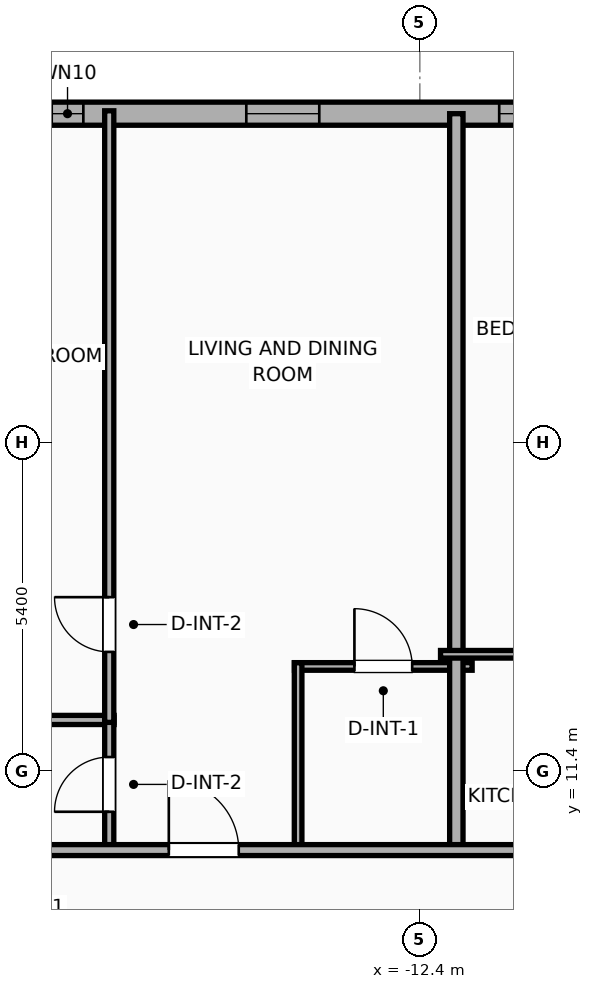
"""IFC4 building model, lengths in metres.
Left out: names, types, materials, properties, quantities, classifications, styles, units other than length and angle.
Written with IfcOpenShell. Run it as: python <this file> out.ifc"""

import sys

from ifc_helpers import new_model, si_unit, direction, frame, frame_2d, origin, place, context, subcontext, project, spatial, rectangle, extrude, element, fill, save


model = new_model("IFC4")
c1 = context("Model", 3, precision=1e-05, world=origin(), true_north=direction((0.0, 1.0)))
c2 = subcontext(c1, "Body", "Model", "MODEL_VIEW")
j1 = project(units=[si_unit("LENGTHUNIT", "METRE"), si_unit("PLANEANGLEUNIT", "RADIAN")], contexts=[c1])
p1 = place(None, origin())
s1 = spatial("IfcSite", under=j1, at=p1, CompositionType="ELEMENT")
p2 = place(p1, origin())
s2 = spatial("IfcBuilding", under=s1, at=p2, CompositionType="ELEMENT")
p3 = place(p2, frame((0.0, 0.0, 68.9)))
s3 = spatial("IfcBuildingStorey", under=s2, at=p3, CompositionType="ELEMENT", Elevation=68.9)
p4 = place(p3, frame((-29.581, 22.21, 0.0), z_axis=(0.0, 0.0, 1.0), x_axis=(1.0, 0.0, 0.0)))
e1 = element("IfcWall", 1, at=p4, inside=s3, PredefinedType="ELEMENTEDWALL", context=c2, shape_type="SweptSolid", body=[
    extrude(rectangle(XDim=51.963, YDim=0.38, at=frame_2d((25.981, 0.0))), origin(), (0.0, 0.0, 1.0), 3.65),
])
p5 = place(p4, frame((5.81, 0.0, 0.75)))
e2 = element("IfcOpeningElement", 2, at=p5, cuts=e1, PredefinedType="OPENING", context=c2, shape_type="SweptSolid", body=[
    extrude(rectangle(XDim=2.4, YDim=2.1, at=frame_2d((1.2, 1.05))), frame((0.0, 0.2, 0.0), z_axis=(0.0, -1.0, 0.0), x_axis=(1.0, 0.0, 0.0)), (0.0, 0.0, 1.0), 0.4),
])
p6 = place(p4, frame((23.931, 0.0, 0.75)))
e3 = element("IfcOpeningElement", 3, at=p6, cuts=e1, PredefinedType="OPENING", context=c2, shape_type="SweptSolid", body=[
    extrude(rectangle(XDim=2.4, YDim=2.1, at=frame_2d((1.2, 1.05))), frame((0.0, 0.2, 0.0), z_axis=(0.0, -1.0, 0.0), x_axis=(1.0, 0.0, 0.0)), (0.0, 0.0, 1.0), 0.4),
])
p7 = place(p4, frame((3.056, 0.0, 0.75)))
e4 = element("IfcOpeningElement", 4, at=p7, cuts=e1, PredefinedType="OPENING", context=c2, shape_type="SweptSolid", body=[
    extrude(rectangle(XDim=1.2, YDim=2.05, at=frame_2d((0.6, 1.025))), frame((0.0, 0.2, 0.0), z_axis=(0.0, -1.0, 0.0), x_axis=(1.0, 0.0, 0.0)), (0.0, 0.0, 1.0), 0.4),
])
p8 = place(p4, frame((11.127, 0.0, 0.75)))
e5 = element("IfcOpeningElement", 5, at=p8, cuts=e1, PredefinedType="OPENING", context=c2, shape_type="SweptSolid", body=[
    extrude(rectangle(XDim=0.52, YDim=2.05, at=frame_2d((0.26, 1.025))), frame((0.0, 0.2, 0.0), z_axis=(0.0, -1.0, 0.0), x_axis=(1.0, 0.0, 0.0)), (0.0, 0.0, 1.0), 0.4),
])
p9 = place(p4, frame((14.327, 0.0, 0.75)))
e6 = element("IfcOpeningElement", 6, at=p9, cuts=e1, PredefinedType="OPENING", context=c2, shape_type="SweptSolid", body=[
    extrude(rectangle(XDim=1.2, YDim=2.05, at=frame_2d((0.6, 1.025))), frame((0.0, 0.2, 0.0), z_axis=(0.0, -1.0, 0.0), x_axis=(1.0, 0.0, 0.0)), (0.0, 0.0, 1.0), 0.4),
])
p10 = place(p4, frame((21.641, 0.0, 0.75)))
e7 = element("IfcOpeningElement", 7, at=p10, cuts=e1, PredefinedType="OPENING", context=c2, shape_type="SweptSolid", body=[
    extrude(rectangle(XDim=1.2, YDim=2.05, at=frame_2d((0.6, 1.025))), frame((0.0, 0.2, 0.0), z_axis=(0.0, -1.0, 0.0), x_axis=(1.0, 0.0, 0.0)), (0.0, 0.0, 1.0), 0.4),
])
p11 = place(p4, frame((18.486, 0.0, 0.75)))
e8 = element("IfcOpeningElement", 8, at=p11, cuts=e1, PredefinedType="OPENING", context=c2, shape_type="SweptSolid", body=[
    extrude(rectangle(XDim=1.2, YDim=2.05, at=frame_2d((0.6, 1.025))), frame((0.0, 0.2, 0.0), z_axis=(0.0, -1.0, 0.0), x_axis=(1.0, 0.0, 0.0)), (0.0, 0.0, 1.0), 0.4),
])
p12 = place(p4, frame((28.976, 0.0, 0.75)))
e9 = element("IfcOpeningElement", 9, at=p12, cuts=e1, PredefinedType="OPENING", context=c2, shape_type="SweptSolid", body=[
    extrude(rectangle(XDim=1.2, YDim=2.05, at=frame_2d((0.6, 1.025))), frame((0.0, 0.2, 0.0), z_axis=(0.0, -1.0, 0.0), x_axis=(1.0, 0.0, 0.0)), (0.0, 0.0, 1.0), 0.4),
])
p13 = place(p4, frame((33.476, 0.0, 0.75)))
e10 = element("IfcOpeningElement", 10, at=p13, cuts=e1, PredefinedType="OPENING", context=c2, shape_type="SweptSolid", body=[
    extrude(rectangle(XDim=1.2, YDim=2.05, at=frame_2d((0.6, 1.025))), frame((0.0, 0.2, 0.0), z_axis=(0.0, -1.0, 0.0), x_axis=(1.0, 0.0, 0.0)), (0.0, 0.0, 1.0), 0.4),
])
p14 = place(p4, frame((36.752, 0.0, 0.75)))
e11 = element("IfcOpeningElement", 11, at=p14, cuts=e1, PredefinedType="OPENING", context=c2, shape_type="SweptSolid", body=[
    extrude(rectangle(XDim=1.2, YDim=2.05, at=frame_2d((0.6, 1.025))), frame((0.0, 0.2, 0.0), z_axis=(0.0, -1.0, 0.0), x_axis=(1.0, 0.0, 0.0)), (0.0, 0.0, 1.0), 0.4),
])
p15 = place(p4, frame((42.452, 0.0, 0.75)))
e12 = element("IfcOpeningElement", 12, at=p15, cuts=e1, PredefinedType="OPENING", context=c2, shape_type="SweptSolid", body=[
    extrude(rectangle(XDim=1.2, YDim=2.05, at=frame_2d((0.6, 1.025))), frame((0.0, 0.2, 0.0), z_axis=(0.0, -1.0, 0.0), x_axis=(1.0, 0.0, 0.0)), (0.0, 0.0, 1.0), 0.4),
])
p16 = place(p4, frame((45.831, 0.0, 0.75)))
e13 = element("IfcOpeningElement", 13, at=p16, cuts=e1, PredefinedType="OPENING", context=c2, shape_type="SweptSolid", body=[
    extrude(rectangle(XDim=1.2, YDim=2.05, at=frame_2d((0.6, 1.025))), frame((0.0, 0.2, 0.0), z_axis=(0.0, -1.0, 0.0), x_axis=(1.0, 0.0, 0.0)), (0.0, 0.0, 1.0), 0.4),
])
p17 = place(p4, frame((48.585, 0.0, 0.75)))
e14 = element("IfcOpeningElement", 14, at=p17, cuts=e1, PredefinedType="OPENING", context=c2, shape_type="SweptSolid", body=[
    extrude(rectangle(XDim=1.2, YDim=2.05, at=frame_2d((0.6, 1.025))), frame((0.0, 0.2, 0.0), z_axis=(0.0, -1.0, 0.0), x_axis=(1.0, 0.0, 0.0)), (0.0, 0.0, 1.0), 0.4),
])
p18 = place(p4, frame((50.421, 0.0, 0.75)))
e15 = element("IfcOpeningElement", 15, at=p18, cuts=e1, PredefinedType="OPENING", context=c2, shape_type="SweptSolid", body=[
    extrude(rectangle(XDim=0.52, YDim=2.05, at=frame_2d((0.26, 1.025))), frame((0.0, 0.2, 0.0), z_axis=(0.0, -1.0, 0.0), x_axis=(1.0, 0.0, 0.0)), (0.0, 0.0, 1.0), 0.4),
])
p19 = place(p3, frame((-21.06, 12.24, 0.0), z_axis=(0.0, 0.0, 1.0), x_axis=(1.0, 0.0, 0.0)))
e16 = element("IfcWall", 16, at=p19, inside=s3, PredefinedType="PLUMBINGWALL", context=c2, shape_type="SweptSolid", body=[
    extrude(rectangle(XDim=3.632, YDim=0.15, at=frame_2d((1.816, 0.0))), origin(), (0.0, 0.0, 1.0), 3.65),
])
p20 = place(p3, frame((-17.508, 10.08, 0.0), z_axis=(0.0, 0.0, 1.0), x_axis=(0.0, 1.0, 0.0)))
e17 = element("IfcWall", 17, at=p20, inside=s3, PredefinedType="PLUMBINGWALL", context=c2, shape_type="SweptSolid", body=[
    extrude(rectangle(XDim=2.2, YDim=0.15, at=frame_2d((1.1, 0.0))), origin(), (0.0, 0.0, 1.0), 3.65),
])
p21 = place(p20, frame((0.65, 0.0, 0.0)))
e18 = element("IfcOpeningElement", 18, at=p21, cuts=e17, PredefinedType="OPENING", context=c2, shape_type="SweptSolid", body=[
    extrude(rectangle(XDim=0.9, YDim=2.05, at=frame_2d((0.45, 1.025))), frame((0.0, 0.085, 0.0), z_axis=(0.0, -1.0, 0.0), x_axis=(1.0, 0.0, 0.0)), (0.0, 0.0, 1.0), 0.17),
])
p22 = place(p3, frame((-17.508, 12.2, 0.0), z_axis=(0.0, 0.0, 1.0), x_axis=(0.0, 1.0, 0.0)))
e19 = element("IfcWall", 19, at=p22, inside=s3, PredefinedType="PLUMBINGWALL", context=c2, shape_type="SweptSolid", body=[
    extrude(rectangle(XDim=10.058, YDim=0.15, at=frame_2d((5.029, 0.0))), origin(), (0.0, 0.0, 1.0), 3.65),
])
p23 = place(p22, frame((1.159, 0.0, 0.0)))
e20 = element("IfcOpeningElement", 20, at=p23, cuts=e19, PredefinedType="OPENING", context=c2, shape_type="SweptSolid", body=[
    extrude(rectangle(XDim=0.9, YDim=2.05, at=frame_2d((0.45, 1.025))), frame((0.0, 0.085, 0.0), z_axis=(0.0, -1.0, 0.0), x_axis=(1.0, 0.0, 0.0)), (0.0, 0.0, 1.0), 0.17),
])
p24 = place(p3, frame((-14.462, 13.12, 0.0), z_axis=(0.0, 0.0, 1.0), x_axis=(1.0, 0.0, 0.0)))
e21 = element("IfcWall", 21, at=p24, inside=s3, PredefinedType="PARTITIONING", context=c2, shape_type="SweptSolid", body=[
    extrude(rectangle(XDim=2.922, YDim=0.125, at=frame_2d((1.461, 0.0))), origin(), (0.0, 0.0, 1.0), 3.65),
])
p25 = place(p24, frame((0.986, 0.0, 0.0)))
e22 = element("IfcOpeningElement", 22, at=p25, cuts=e21, PredefinedType="OPENING", context=c2, shape_type="SweptSolid", body=[
    extrude(rectangle(XDim=0.95, YDim=2.05, at=frame_2d((0.475, 1.025))), frame((0.0, 0.073, 0.0), z_axis=(0.0, -1.0, 0.0), x_axis=(1.0, 0.0, 0.0)), (0.0, 0.0, 1.0), 0.145),
])
p26 = place(p3, frame((-14.402, 10.08, 0.0), z_axis=(0.0, 0.0, 1.0), x_axis=(0.0, 1.0, 0.0)))
e23 = element("IfcWall", 23, at=p26, inside=s3, PredefinedType="PARTITIONING", context=c2, shape_type="SweptSolid", body=[
    extrude(rectangle(XDim=3.1, YDim=0.125, at=frame_2d((1.55, 0.0))), origin(), (0.0, 0.0, 1.0), 3.65),
])
p27 = place(p3, frame((-11.8, 10.02, 0.0), z_axis=(0.0, 0.0, 1.0), x_axis=(0.0, 1.0, 0.0)))
e24 = element("IfcWall", 24, at=p27, inside=s3, PredefinedType="PARTITIONING", context=c2, shape_type="SweptSolid", body=[
    extrude(rectangle(XDim=12.19, YDim=0.22, at=frame_2d((6.095, 0.0))), origin(), (0.0, 0.0, 1.0), 2.94),
])
p28 = place(p3, frame((-12.06, 13.32, 0.0), z_axis=(0.0, 0.0, 1.0), x_axis=(1.0, 0.0, 0.0)))
e25 = element("IfcWall", 25, at=p28, inside=s3, PredefinedType="PARTITIONING", context=c2, shape_type="SweptSolid", body=[
    extrude(rectangle(XDim=2.99, YDim=0.125, at=frame_2d((1.495, 0.0))), origin(), (0.0, 0.0, 1.0), 3.65),
])
p29 = place(p3, frame((-33.41, 10.1, 0.0), z_axis=(0.0, 0.0, 1.0), x_axis=(1.0, 0.0, 0.0)))
e26 = element("IfcWall", 26, at=p29, inside=s3, PredefinedType="PARTITIONING", context=c2, shape_type="SweptSolid", body=[
    extrude(rectangle(XDim=59.62, YDim=0.18, at=frame_2d((29.81, 0.0))), origin(), (0.0, 0.0, 1.0), 3.65),
])
p30 = place(p29, frame((2.793, 0.0, 0.0)))
e27 = element("IfcOpeningElement", 27, at=p30, cuts=e26, PredefinedType="OPENING", context=c2, shape_type="SweptSolid", body=[
    extrude(rectangle(XDim=0.9, YDim=2.05, at=frame_2d((0.45, 1.025))), frame((0.0, 0.1, 0.0), z_axis=(0.0, -1.0, 0.0), x_axis=(1.0, 0.0, 0.0)), (0.0, 0.0, 1.0), 0.2),
])
p31 = place(p29, frame((10.037, 0.0, 0.0)))
e28 = element("IfcOpeningElement", 28, at=p31, cuts=e26, PredefinedType="OPENING", context=c2, shape_type="SweptSolid", body=[
    extrude(rectangle(XDim=1.15, YDim=2.05, at=frame_2d((0.575, 1.025))), frame((0.0, 0.1, 0.0), z_axis=(0.0, -1.0, 0.0), x_axis=(1.0, 0.0, 0.0)), (0.0, 0.0, 1.0), 0.2),
])
p32 = place(p29, frame((16.882, 0.0, 0.0)))
e29 = element("IfcOpeningElement", 29, at=p32, cuts=e26, PredefinedType="OPENING", context=c2, shape_type="SweptSolid", body=[
    extrude(rectangle(XDim=1.15, YDim=2.05, at=frame_2d((0.575, 1.025))), frame((0.0, 0.1, 0.0), z_axis=(0.0, -1.0, 0.0), x_axis=(1.0, 0.0, 0.0)), (0.0, 0.0, 1.0), 0.2),
])
p33 = place(p29, frame((25.801, 0.0, 0.0)))
e30 = element("IfcOpeningElement", 30, at=p33, cuts=e26, PredefinedType="OPENING", context=c2, shape_type="SweptSolid", body=[
    extrude(rectangle(XDim=1.15, YDim=2.05, at=frame_2d((0.575, 1.025))), frame((0.0, 0.1, 0.0), z_axis=(0.0, -1.0, 0.0), x_axis=(1.0, 0.0, 0.0)), (0.0, 0.0, 1.0), 0.2),
])
p34 = place(p29, frame((34.72, 0.0, 0.0)))
e31 = element("IfcOpeningElement", 31, at=p34, cuts=e26, PredefinedType="OPENING", context=c2, shape_type="SweptSolid", body=[
    extrude(rectangle(XDim=1.15, YDim=2.05, at=frame_2d((0.575, 1.025))), frame((0.0, 0.1, 0.0), z_axis=(0.0, -1.0, 0.0), x_axis=(1.0, 0.0, 0.0)), (0.0, 0.0, 1.0), 0.2),
])
p35 = place(p29, frame((43.771, 0.0, 0.0)))
e32 = element("IfcOpeningElement", 32, at=p35, cuts=e26, PredefinedType="OPENING", context=c2, shape_type="SweptSolid", body=[
    extrude(rectangle(XDim=1.15, YDim=2.05, at=frame_2d((0.575, 1.025))), frame((0.0, 0.1, 0.0), z_axis=(0.0, -1.0, 0.0), x_axis=(1.0, 0.0, 0.0)), (0.0, 0.0, 1.0), 0.2),
])
p36 = place(p29, frame((49.715, 0.0, 0.0)))
e33 = element("IfcOpeningElement", 33, at=p36, cuts=e26, PredefinedType="OPENING", context=c2, shape_type="SweptSolid", body=[
    extrude(rectangle(XDim=1.15, YDim=2.05, at=frame_2d((0.575, 1.025))), frame((0.0, 0.1, 0.0), z_axis=(0.0, -1.0, 0.0), x_axis=(1.0, 0.0, 0.0)), (0.0, 0.0, 1.0), 0.2),
])
p37 = place(p29, frame((56.654, 0.0, 0.0)))
e34 = element("IfcOpeningElement", 34, at=p37, cuts=e26, PredefinedType="OPENING", context=c2, shape_type="SweptSolid", body=[
    extrude(rectangle(XDim=0.9, YDim=2.05, at=frame_2d((0.45, 1.025))), frame((0.0, 0.1, 0.0), z_axis=(0.0, -1.0, 0.0), x_axis=(1.0, 0.0, 0.0)), (0.0, 0.0, 1.0), 0.2),
])
p38 = place(p8, origin())
e35 = element("IfcWindow", 35, at=p38, inside=s3, PartitioningType="SINGLE_PANEL", PredefinedType="WINDOW", context=c2, shape_type="SweptSolid", body=[
    extrude(rectangle(XDim=0.52, YDim=2.05, at=frame_2d((0.26, 1.025))), frame((0.0, 0.03, 0.0), z_axis=(0.0, -1.0, 0.0), x_axis=(1.0, 0.0, 0.0)), (0.0, 0.0, 1.0), 0.06),
])
fill(e5, e35)
p39 = place(p9, origin())
e36 = element("IfcWindow", 36, at=p39, inside=s3, PartitioningType="SINGLE_PANEL", PredefinedType="WINDOW", context=c2, shape_type="SweptSolid", body=[
    extrude(rectangle(XDim=1.2, YDim=2.05, at=frame_2d((0.6, 1.025))), frame((0.0, 0.03, 0.0), z_axis=(0.0, -1.0, 0.0), x_axis=(1.0, 0.0, 0.0)), (0.0, 0.0, 1.0), 0.06),
])
fill(e6, e36)
p40 = place(p11, origin())
e37 = element("IfcWindow", 37, at=p40, inside=s3, PartitioningType="SINGLE_PANEL", PredefinedType="WINDOW", context=c2, shape_type="SweptSolid", body=[
    extrude(rectangle(XDim=1.2, YDim=2.05, at=frame_2d((0.6, 1.025))), frame((0.0, 0.03, 0.0), z_axis=(0.0, -1.0, 0.0), x_axis=(1.0, 0.0, 0.0)), (0.0, 0.0, 1.0), 0.06),
])
fill(e8, e37)
p41 = place(p21, origin())
e38 = element("IfcDoor", 38, at=p41, inside=s3, OperationType="SINGLE_SWING_LEFT", PredefinedType="DOOR", context=c2, shape_type="SweptSolid", body=[
    extrude(rectangle(XDim=0.9, YDim=2.05, at=frame_2d((0.45, 1.025))), frame((0.0, 0.025, 0.0), z_axis=(0.0, -1.0, 0.0), x_axis=(1.0, 0.0, 0.0)), (0.0, 0.0, 1.0), 0.05),
])
fill(e18, e38)
p42 = place(p23, origin())
e39 = element("IfcDoor", 39, at=p42, inside=s3, OperationType="SINGLE_SWING_RIGHT", PredefinedType="DOOR", context=c2, shape_type="SweptSolid", body=[
    extrude(rectangle(XDim=0.9, YDim=2.05, at=frame_2d((0.45, 1.025))), frame((0.0, 0.025, 0.0), z_axis=(0.0, -1.0, 0.0), x_axis=(1.0, 0.0, 0.0)), (0.0, 0.0, 1.0), 0.05),
])
fill(e20, e39)
p43 = place(p25, origin())
e40 = element("IfcDoor", 40, at=p43, inside=s3, OperationType="SINGLE_SWING_LEFT", PredefinedType="DOOR", context=c2, shape_type="SweptSolid", body=[
    extrude(rectangle(XDim=0.95, YDim=2.05, at=frame_2d((0.475, 1.025))), frame((0.0, 0.025, 0.0), z_axis=(0.0, -1.0, 0.0), x_axis=(1.0, 0.0, 0.0)), (0.0, 0.0, 1.0), 0.05),
])
fill(e22, e40)
p44 = place(p32, origin())
e41 = element("IfcDoor", 41, at=p44, inside=s3, OperationType="SINGLE_SWING_LEFT", PredefinedType="DOOR", context=c2, shape_type="SweptSolid", body=[
    extrude(rectangle(XDim=1.15, YDim=2.05, at=frame_2d((0.575, 1.025))), frame((0.0, 0.025, 0.0), z_axis=(0.0, -1.0, 0.0), x_axis=(1.0, 0.0, 0.0)), (0.0, 0.0, 1.0), 0.05),
])
fill(e29, e41)
save(model, sys.argv[1])
